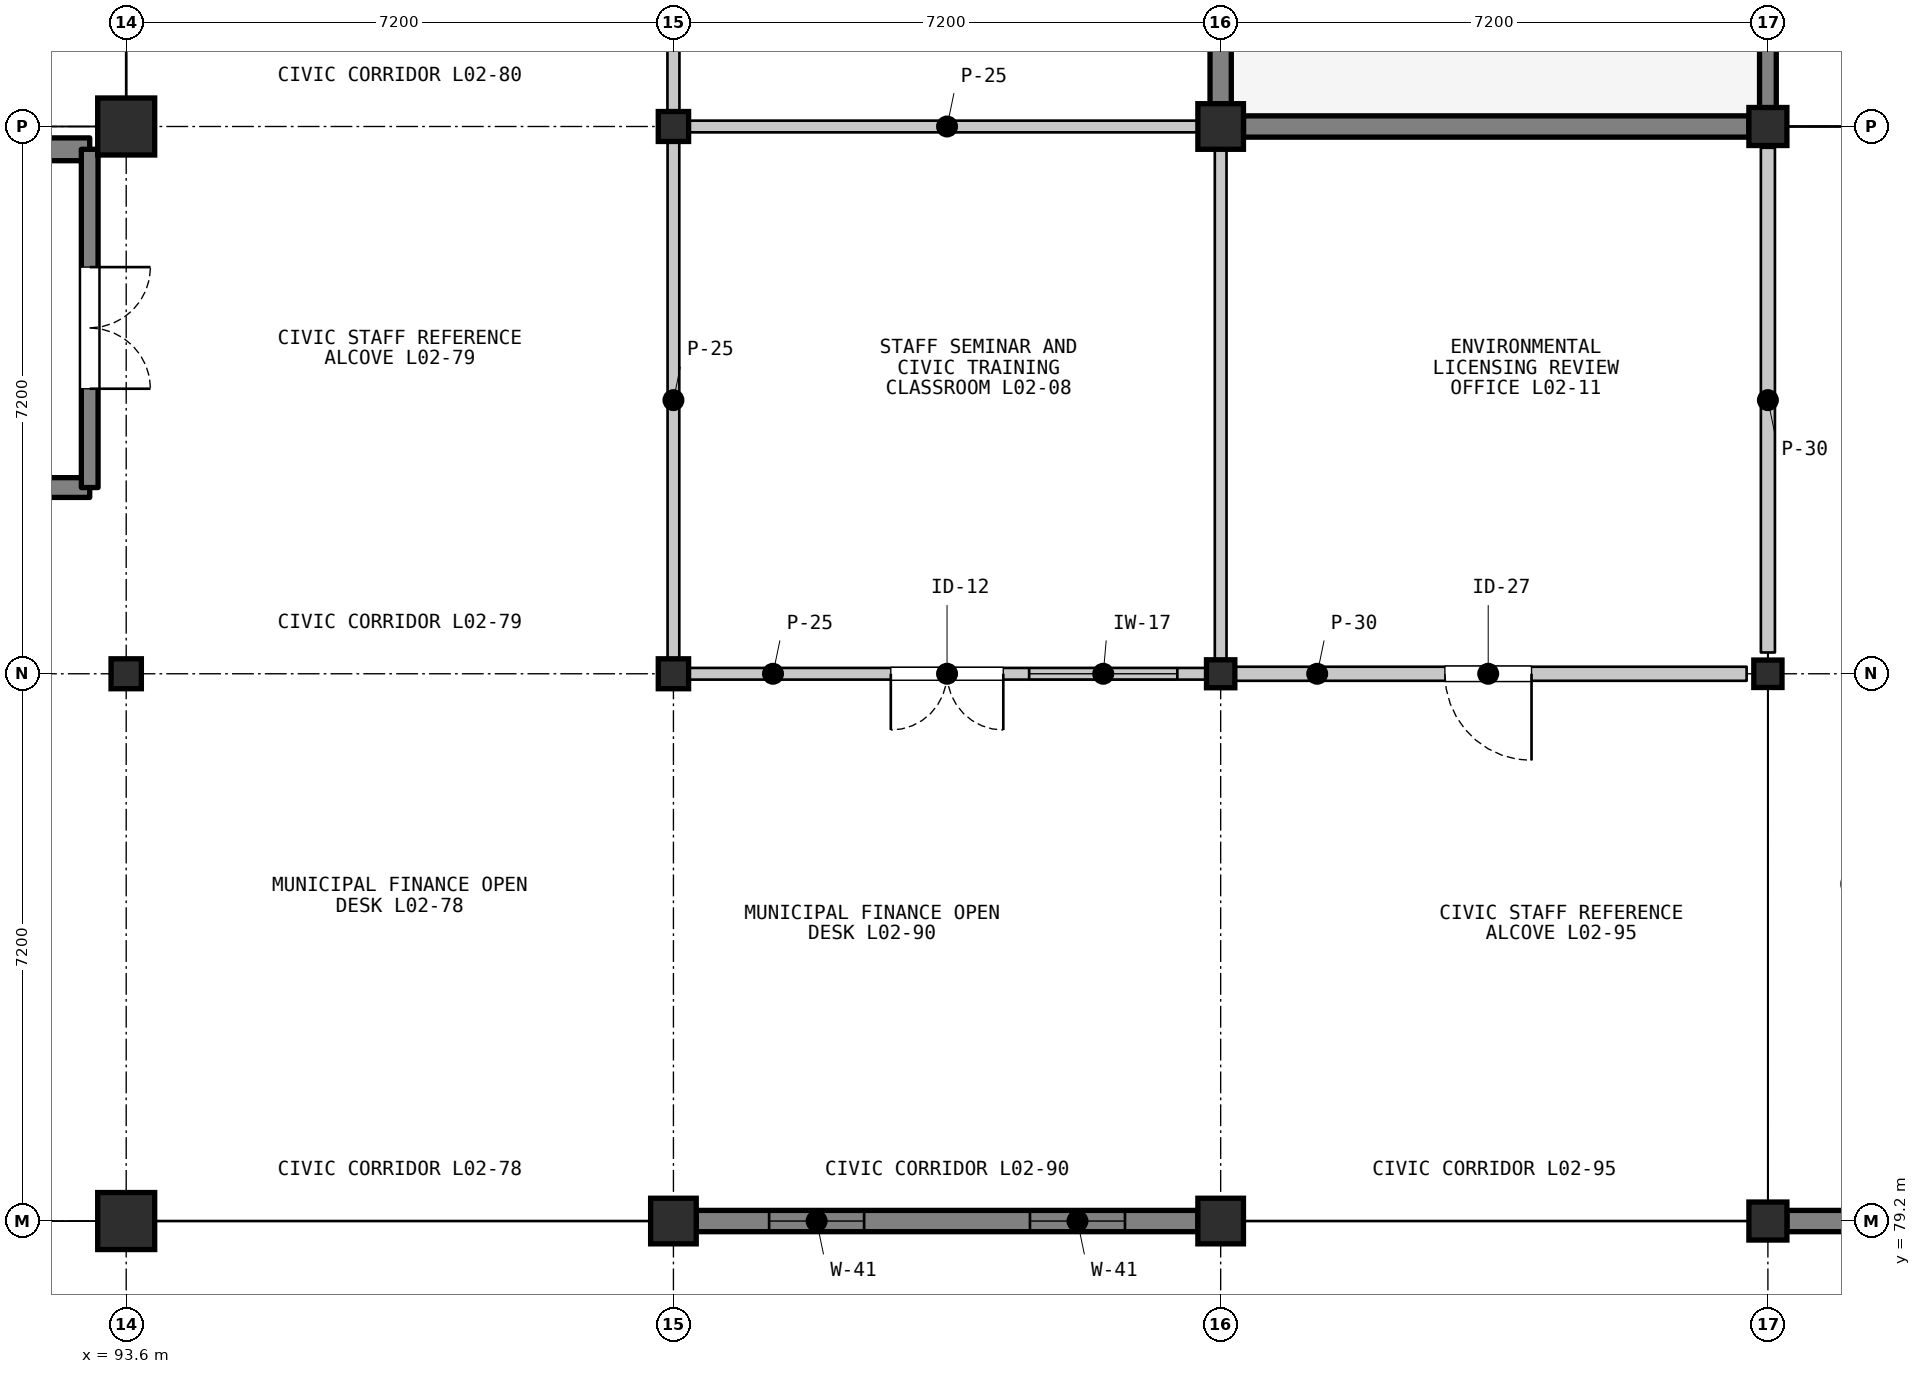
"""IFC4 building model, lengths in metres.
Left out: names, types, materials, properties, quantities, classifications, styles, units other than length and angle.
Written with IfcOpenShell. Run it as: python <this file> out.ifc"""

import sys

from ifc_helpers import new_model, si_unit, direction, frame, frame_2d, origin, origin_2d, place, context, subcontext, project, spatial, rectangle, i_section, extrude, element, fill, save


model = new_model("IFC4")
c1 = context("Model", 3, precision=1e-05, world=origin(), true_north=direction((0.0, 1.0)))
c2 = subcontext(c1, "Body", "Model", "MODEL_VIEW")
j1 = project(units=[si_unit("LENGTHUNIT", "METRE"), si_unit("PLANEANGLEUNIT", "RADIAN")], contexts=[c1])
p1 = place(None, origin())
s1 = spatial("IfcSite", under=j1, at=p1, CompositionType="ELEMENT")
p2 = place(p1, origin())
s2 = spatial("IfcBuilding", under=s1, at=p2, CompositionType="ELEMENT")
p3 = place(p2, frame((0.0, 0.0, 5.4)))
s3 = spatial("IfcBuildingStorey", under=s2, at=p3, CompositionType="ELEMENT", Elevation=5.4)
p4 = place(p3, frame((93.6, 79.2, 0.0), z_axis=(0.0, 0.0, 1.0), x_axis=(1.0, 0.0, 0.0)))
e1 = element("IfcColumn", 1, at=p4, inside=s3, PredefinedType="COLUMN", context=c2, shape_type="SweptSolid", body=[
    extrude(rectangle(XDim=0.75, YDim=0.75, at=origin_2d()), origin(), (0.0, 0.0, 1.0), 4.5),
])
p5 = place(p3, frame((93.6, 86.4, 0.0), z_axis=(0.0, 0.0, 1.0), x_axis=(1.0, 0.0, 0.0)))
e2 = element("IfcColumn", 2, at=p5, inside=s3, PredefinedType="COLUMN", context=c2, shape_type="SweptSolid", body=[
    extrude(i_section(OverallWidth=0.399, OverallDepth=0.394, WebThickness=0.023, FlangeThickness=0.037, FilletRadius=0.015, at=origin_2d()), origin(), (0.0, 0.0, 1.0), 4.5),
])
p6 = place(p3, frame((93.6, 93.6, 0.0), z_axis=(0.0, 0.0, 1.0), x_axis=(1.0, 0.0, 0.0)))
e3 = element("IfcColumn", 3, at=p6, inside=s3, PredefinedType="COLUMN", context=c2, shape_type="SweptSolid", body=[
    extrude(rectangle(XDim=0.75, YDim=0.75, at=origin_2d()), origin(), (0.0, 0.0, 1.0), 4.5),
])
p7 = place(p3, frame((100.8, 79.2, 0.0), z_axis=(0.0, 0.0, 1.0), x_axis=(1.0, 0.0, 0.0)))
e4 = element("IfcColumn", 4, at=p7, inside=s3, PredefinedType="COLUMN", context=c2, shape_type="SweptSolid", body=[
    extrude(rectangle(XDim=0.6, YDim=0.6, at=origin_2d()), origin(), (0.0, 0.0, 1.0), 4.5),
])
for number, where, z_axis, x_axis in (
    (5, (100.8, 86.4, 0.0), (0.0, 0.0, 1.0), (1.0, 0.0, 0.0)),
    (6, (100.8, 93.6, 0.0), (0.0, 0.0, 1.0), (1.0, 0.0, 0.0)),
):
    element("IfcColumn", number, at=place(p3, frame(where, z_axis=z_axis, x_axis=x_axis)), inside=s3, PredefinedType="COLUMN", context=c2, shape_type="SweptSolid", body=[
        extrude(i_section(OverallWidth=0.399, OverallDepth=0.394, WebThickness=0.023, FlangeThickness=0.037, FilletRadius=0.015, at=origin_2d()), origin(), (0.0, 0.0, 1.0), 4.5),
    ])
p8 = place(p3, frame((108.0, 79.2, 0.0), z_axis=(0.0, 0.0, 1.0), x_axis=(1.0, 0.0, 0.0)))
e7 = element("IfcColumn", 7, at=p8, inside=s3, PredefinedType="COLUMN", context=c2, shape_type="SweptSolid", body=[
    extrude(rectangle(XDim=0.6, YDim=0.6, at=origin_2d()), origin(), (0.0, 0.0, 1.0), 4.5),
])
p9 = place(p3, frame((108.0, 86.4, 0.0), z_axis=(0.0, 0.0, 1.0), x_axis=(1.0, 0.0, 0.0)))
e8 = element("IfcColumn", 8, at=p9, inside=s3, PredefinedType="COLUMN", context=c2, shape_type="SweptSolid", body=[
    extrude(i_section(OverallWidth=0.373, OverallDepth=0.368, WebThickness=0.015, FlangeThickness=0.024, FilletRadius=0.015, at=origin_2d()), origin(), (0.0, 0.0, 1.0), 4.5),
])
p10 = place(p3, frame((108.0, 93.6, 0.0), z_axis=(0.0, 0.0, 1.0), x_axis=(1.0, 0.0, 0.0)))
e9 = element("IfcColumn", 9, at=p10, inside=s3, PredefinedType="COLUMN", context=c2, shape_type="SweptSolid", body=[
    extrude(rectangle(XDim=0.6, YDim=0.6, at=origin_2d()), origin(), (0.0, 0.0, 1.0), 4.5),
])
p11 = place(p3, frame((115.2, 79.2, 0.0), z_axis=(0.0, 0.0, 1.0), x_axis=(1.0, 0.0, 0.0)))
e10 = element("IfcColumn", 10, at=p11, inside=s3, PredefinedType="COLUMN", context=c2, shape_type="SweptSolid", body=[
    extrude(rectangle(XDim=0.5, YDim=0.5, at=origin_2d()), origin(), (0.0, 0.0, 1.0), 4.5),
])
p12 = place(p3, frame((115.2, 86.4, 0.0), z_axis=(0.0, 0.0, 1.0), x_axis=(1.0, 0.0, 0.0)))
e11 = element("IfcColumn", 11, at=p12, inside=s3, PredefinedType="COLUMN", context=c2, shape_type="SweptSolid", body=[
    extrude(i_section(OverallWidth=0.371, OverallDepth=0.361, WebThickness=0.012, FlangeThickness=0.02, FilletRadius=0.015, at=origin_2d()), origin(), (0.0, 0.0, 1.0), 4.5),
])
p13 = place(p3, frame((115.2, 93.6, 0.0), z_axis=(0.0, 0.0, 1.0), x_axis=(1.0, 0.0, 0.0)))
e12 = element("IfcColumn", 12, at=p13, inside=s3, PredefinedType="COLUMN", context=c2, shape_type="SweptSolid", body=[
    extrude(rectangle(XDim=0.5, YDim=0.5, at=origin_2d()), origin(), (0.0, 0.0, 1.0), 4.5),
])
p14 = place(p3, frame((107.7, 79.2, 0.0), z_axis=(0.0, 0.0, 1.0), x_axis=(-1.0, 0.0, 0.0)))
e13 = element("IfcWall", 13, at=p14, inside=s3, PredefinedType="SOLIDWALL", context=c2, shape_type="SweptSolid", body=[
    extrude(rectangle(XDim=6.6, YDim=0.28, at=frame_2d((3.3, 0.0))), origin(), (0.0, 0.0, 1.0), 3.698),
])
p15 = place(p14, frame((0.959, 0.0, 0.95)))
e14 = element("IfcOpeningElement", 14, at=p15, cuts=e13, PredefinedType="OPENING", context=c2, shape_type="SweptSolid", body=[
    extrude(rectangle(XDim=1.25, YDim=1.85, at=frame_2d((0.625, 0.925))), frame((0.0, 0.15, 0.0), z_axis=(0.0, -1.0, 0.0), x_axis=(1.0, 0.0, 0.0)), (0.0, 0.0, 1.0), 0.3),
])
p16 = place(p14, frame((4.391, 0.0, 0.95)))
e15 = element("IfcOpeningElement", 15, at=p16, cuts=e13, PredefinedType="OPENING", context=c2, shape_type="SweptSolid", body=[
    extrude(rectangle(XDim=1.25, YDim=1.85, at=frame_2d((0.625, 0.925))), frame((0.0, 0.15, 0.0), z_axis=(0.0, -1.0, 0.0), x_axis=(1.0, 0.0, 0.0)), (0.0, 0.0, 1.0), 0.3),
])
p17 = place(p3, frame((108.0, 100.5, 0.0), z_axis=(0.0, 0.0, 1.0), x_axis=(0.0, -1.0, 0.0)))
e16 = element("IfcWall", 16, at=p17, inside=s3, PredefinedType="SOLIDWALL", context=c2, shape_type="SweptSolid", body=[
    extrude(rectangle(XDim=6.6, YDim=0.28, at=frame_2d((3.3, 0.0))), origin(), (0.0, 0.0, 1.0), 3.767),
])
p18 = place(p17, frame((0.909, 0.0, 0.95)))
e17 = element("IfcOpeningElement", 17, at=p18, cuts=e16, PredefinedType="OPENING", context=c2, shape_type="SweptSolid", body=[
    extrude(rectangle(XDim=1.35, YDim=1.85, at=frame_2d((0.675, 0.925))), frame((0.0, 0.15, 0.0), z_axis=(0.0, -1.0, 0.0), x_axis=(1.0, 0.0, 0.0)), (0.0, 0.0, 1.0), 0.3),
])
p19 = place(p17, frame((4.341, 0.0, 0.95)))
e18 = element("IfcOpeningElement", 18, at=p19, cuts=e16, PredefinedType="OPENING", context=c2, shape_type="SweptSolid", body=[
    extrude(rectangle(XDim=1.35, YDim=1.85, at=frame_2d((0.675, 0.925))), frame((0.0, 0.15, 0.0), z_axis=(0.0, -1.0, 0.0), x_axis=(1.0, 0.0, 0.0)), (0.0, 0.0, 1.0), 0.3),
])
p20 = place(p3, frame((108.3, 93.6, 0.0), z_axis=(0.0, 0.0, 1.0), x_axis=(1.0, 0.0, 0.0)))
e19 = element("IfcWall", 19, at=p20, inside=s3, PredefinedType="SOLIDWALL", context=c2, shape_type="SweptSolid", body=[
    extrude(rectangle(XDim=6.65, YDim=0.28, at=frame_2d((3.325, 0.0))), origin(), (0.0, 0.0, 1.0), 3.698),
])
p21 = place(p3, frame((122.1, 79.2, 0.0), z_axis=(0.0, 0.0, 1.0), x_axis=(-1.0, 0.0, 0.0)))
e20 = element("IfcWall", 20, at=p21, inside=s3, PredefinedType="SOLIDWALL", context=c2, shape_type="SweptSolid", body=[
    extrude(rectangle(XDim=6.65, YDim=0.28, at=frame_2d((3.325, 0.0))), origin(), (0.0, 0.0, 1.0), 3.698),
])
p22 = place(p21, frame((0.971, 0.0, 0.95)))
e21 = element("IfcOpeningElement", 21, at=p22, cuts=e20, PredefinedType="OPENING", context=c2, shape_type="SweptSolid", body=[
    extrude(rectangle(XDim=1.25, YDim=1.85, at=frame_2d((0.625, 0.925))), frame((0.0, 0.15, 0.0), z_axis=(0.0, -1.0, 0.0), x_axis=(1.0, 0.0, 0.0)), (0.0, 0.0, 1.0), 0.3),
])
p23 = place(p21, frame((4.429, 0.0, 0.95)))
e22 = element("IfcOpeningElement", 22, at=p23, cuts=e20, PredefinedType="OPENING", context=c2, shape_type="SweptSolid", body=[
    extrude(rectangle(XDim=1.25, YDim=1.85, at=frame_2d((0.625, 0.925))), frame((0.0, 0.15, 0.0), z_axis=(0.0, -1.0, 0.0), x_axis=(1.0, 0.0, 0.0)), (0.0, 0.0, 1.0), 0.3),
])
p24 = place(p3, frame((115.2, 100.65, 0.0), z_axis=(0.0, 0.0, 1.0), x_axis=(0.0, -1.0, 0.0)))
e23 = element("IfcWall", 23, at=p24, inside=s3, PredefinedType="PARAPET", context=c2, shape_type="SweptSolid", body=[
    extrude(rectangle(XDim=6.9, YDim=0.22, at=frame_2d((3.45, 0.0))), origin(), (0.0, 0.0, 1.0), 0.85),
])
p25 = place(p3, frame((87.71, 88.85, 0.0), z_axis=(0.0, 0.0, 1.0), x_axis=(1.0, 0.0, 0.0)))
e24 = element("IfcWall", 24, at=p25, inside=s3, PredefinedType="SHEAR", context=c2, shape_type="SweptSolid", body=[
    extrude(rectangle(XDim=5.41, YDim=0.26, at=frame_2d((2.705, 0.0))), origin(), (0.0, 0.0, 1.0), 4.3),
])
p26 = place(p25, frame((2.84, 0.0, 0.0)))
e25 = element("IfcOpeningElement", 25, at=p26, cuts=e24, PredefinedType="OPENING", context=c2, shape_type="SweptSolid", body=[
    extrude(rectangle(XDim=1.22, YDim=2.15, at=frame_2d((0.61, 1.075))), frame((0.0, 0.14, 0.0), z_axis=(0.0, -1.0, 0.0), x_axis=(1.0, 0.0, 0.0)), (0.0, 0.0, 1.0), 0.28),
])
p27 = place(p3, frame((87.2, 93.3, 0.0), z_axis=(0.0, 0.0, 1.0), x_axis=(1.0, 0.0, 0.0)))
e26 = element("IfcWall", 26, at=p27, inside=s3, PredefinedType="SHEAR", context=c2, shape_type="SweptSolid", body=[
    extrude(rectangle(XDim=5.92, YDim=0.3, at=frame_2d((2.96, 0.0))), origin(), (0.0, 0.0, 1.0), 4.3),
])
p28 = place(p3, frame((93.12, 93.3, 0.0), z_axis=(0.0, 0.0, 1.0), x_axis=(0.0, -1.0, 0.0)))
e27 = element("IfcWall", 27, at=p28, inside=s3, PredefinedType="SHEAR", context=c2, shape_type="SweptSolid", body=[
    extrude(rectangle(XDim=4.45, YDim=0.22, at=frame_2d((2.225, 0.0))), origin(), (0.0, 0.0, 1.0), 4.3),
])
p29 = place(p28, frame((1.55, 0.0, 0.0)))
e28 = element("IfcOpeningElement", 28, at=p29, cuts=e27, PredefinedType="OPENING", context=c2, shape_type="SweptSolid", body=[
    extrude(rectangle(XDim=1.6, YDim=2.2, at=frame_2d((0.8, 1.1))), frame((0.0, 0.12, 0.0), z_axis=(0.0, -1.0, 0.0), x_axis=(1.0, 0.0, 0.0)), (0.0, 0.0, 1.0), 0.24),
])
p30 = place(p3, frame((107.88, 86.4, 0.0), z_axis=(0.0, 0.0, 1.0), x_axis=(-1.0, 0.0, 0.0)))
e29 = element("IfcWall", 29, at=p30, inside=s3, PredefinedType="PARTITIONING", context=c2, shape_type="SweptSolid", body=[
    extrude(rectangle(XDim=6.96, YDim=0.154, at=frame_2d((3.48, 0.0))), origin(), (0.0, 0.0, 1.0), 3.688),
])
p31 = place(p30, frame((2.74, 0.0, 0.0)))
e30 = element("IfcOpeningElement", 30, at=p31, cuts=e29, PredefinedType="OPENING", context=c2, shape_type="SweptSolid", body=[
    extrude(rectangle(XDim=1.48, YDim=2.25, at=frame_2d((0.74, 1.125))), frame((0.0, 0.087, 0.0), z_axis=(0.0, -1.0, 0.0), x_axis=(1.0, 0.0, 0.0)), (0.0, 0.0, 1.0), 0.174),
])
p32 = place(p30, frame((0.45, 0.0, 1.05)))
e31 = element("IfcOpeningElement", 31, at=p32, cuts=e29, PredefinedType="OPENING", context=c2, shape_type="SweptSolid", body=[
    extrude(rectangle(XDim=1.95, YDim=1.22, at=frame_2d((0.975, 0.61))), frame((0.0, 0.087, 0.0), z_axis=(0.0, -1.0, 0.0), x_axis=(1.0, 0.0, 0.0)), (0.0, 0.0, 1.0), 0.174),
])
for number, where, z_axis, x_axis in (
    (32, (100.92, 93.6, 0.0), (0.0, 0.0, 1.0), (1.0, 0.0, 0.0)),
    (33, (100.8, 86.52, 0.0), (0.0, 0.0, 1.0), (0.0, 1.0, 0.0)),
    (34, (108.0, 93.48, 0.0), (0.0, 0.0, 1.0), (0.0, -1.0, 0.0)),
):
    element("IfcWall", number, at=place(p3, frame(where, z_axis=z_axis, x_axis=x_axis)), inside=s3, PredefinedType="PARTITIONING", context=c2, shape_type="SweptSolid", body=[
        extrude(rectangle(XDim=6.96, YDim=0.154, at=frame_2d((3.48, 0.0))), origin(), (0.0, 0.0, 1.0), 3.688),
    ])
p33 = place(p3, frame((100.8, 93.72, 0.0), z_axis=(0.0, 0.0, 1.0), x_axis=(0.0, 1.0, 0.0)))
e35 = element("IfcWall", 35, at=p33, inside=s3, PredefinedType="PARTITIONING", context=c2, shape_type="SweptSolid", body=[
    extrude(rectangle(XDim=6.96, YDim=0.158, at=frame_2d((3.48, 0.0))), origin(), (0.0, 0.0, 1.0), 3.688),
])
p34 = place(p3, frame((114.92, 86.4, 0.0), z_axis=(0.0, 0.0, 1.0), x_axis=(-1.0, 0.0, 0.0)))
e36 = element("IfcWall", 36, at=p34, inside=s3, PredefinedType="PARTITIONING", context=c2, shape_type="SweptSolid", body=[
    extrude(rectangle(XDim=6.8, YDim=0.185, at=frame_2d((3.4, 0.0))), origin(), (0.0, 0.0, 1.0), 3.688),
])
p35 = place(p34, frame((2.83, 0.0, 0.0)))
e37 = element("IfcOpeningElement", 37, at=p35, cuts=e36, PredefinedType="OPENING", context=c2, shape_type="SweptSolid", body=[
    extrude(rectangle(XDim=1.14, YDim=2.18, at=frame_2d((0.57, 1.09))), frame((0.0, 0.103, 0.0), z_axis=(0.0, -1.0, 0.0), x_axis=(1.0, 0.0, 0.0)), (0.0, 0.0, 1.0), 0.205),
])
p36 = place(p3, frame((115.2, 93.32, 0.0), z_axis=(0.0, 0.0, 1.0), x_axis=(0.0, -1.0, 0.0)))
e38 = element("IfcWall", 38, at=p36, inside=s3, PredefinedType="PARTITIONING", context=c2, shape_type="SweptSolid", body=[
    extrude(rectangle(XDim=6.64, YDim=0.185, at=frame_2d((3.32, 0.0))), origin(), (0.0, 0.0, 1.0), 3.757),
])
p37 = place(p15, origin())
e39 = element("IfcWindow", 39, at=p37, inside=s3, PartitioningType="SINGLE_PANEL", PredefinedType="WINDOW", context=c2, shape_type="SweptSolid", body=[
    extrude(rectangle(XDim=1.25, YDim=1.85, at=frame_2d((0.625, 0.925))), frame((0.0, 0.03, 0.0), z_axis=(0.0, -1.0, 0.0), x_axis=(1.0, 0.0, 0.0)), (0.0, 0.0, 1.0), 0.06),
])
fill(e14, e39)
p38 = place(p16, origin())
e40 = element("IfcWindow", 40, at=p38, inside=s3, PartitioningType="SINGLE_PANEL", PredefinedType="WINDOW", context=c2, shape_type="SweptSolid", body=[
    extrude(rectangle(XDim=1.25, YDim=1.85, at=frame_2d((0.625, 0.925))), frame((0.0, 0.03, 0.0), z_axis=(0.0, -1.0, 0.0), x_axis=(1.0, 0.0, 0.0)), (0.0, 0.0, 1.0), 0.06),
])
fill(e15, e40)
p39 = place(p29, origin())
e41 = element("IfcDoor", 41, at=p39, inside=s3, OperationType="DOUBLE_DOOR_SINGLE_SWING", PredefinedType="DOOR", context=c2, shape_type="SweptSolid", body=[
    extrude(rectangle(XDim=1.6, YDim=2.2, at=frame_2d((0.8, 1.1))), frame((0.0, 0.025, 0.0), z_axis=(0.0, -1.0, 0.0), x_axis=(1.0, 0.0, 0.0)), (0.0, 0.0, 1.0), 0.05),
])
fill(e28, e41)
p40 = place(p31, origin())
e42 = element("IfcDoor", 42, at=p40, inside=s3, OperationType="DOUBLE_DOOR_SINGLE_SWING", PredefinedType="DOOR", context=c2, shape_type="SweptSolid", body=[
    extrude(rectangle(XDim=1.48, YDim=2.25, at=frame_2d((0.74, 1.125))), frame((0.0, 0.025, 0.0), z_axis=(0.0, -1.0, 0.0), x_axis=(1.0, 0.0, 0.0)), (0.0, 0.0, 1.0), 0.05),
])
fill(e30, e42)
p41 = place(p32, origin())
e43 = element("IfcWindow", 43, at=p41, inside=s3, PartitioningType="SINGLE_PANEL", PredefinedType="WINDOW", context=c2, shape_type="SweptSolid", body=[
    extrude(rectangle(XDim=1.95, YDim=1.22, at=frame_2d((0.975, 0.61))), frame((0.0, 0.03, 0.0), z_axis=(0.0, -1.0, 0.0), x_axis=(1.0, 0.0, 0.0)), (0.0, 0.0, 1.0), 0.06),
])
fill(e31, e43)
p42 = place(p35, origin())
e44 = element("IfcDoor", 44, at=p42, inside=s3, OperationType="SINGLE_SWING_LEFT", PredefinedType="DOOR", context=c2, shape_type="SweptSolid", body=[
    extrude(rectangle(XDim=1.14, YDim=2.18, at=frame_2d((0.57, 1.09))), frame((0.0, 0.025, 0.0), z_axis=(0.0, -1.0, 0.0), x_axis=(1.0, 0.0, 0.0)), (0.0, 0.0, 1.0), 0.05),
])
fill(e37, e44)
save(model, sys.argv[1])
